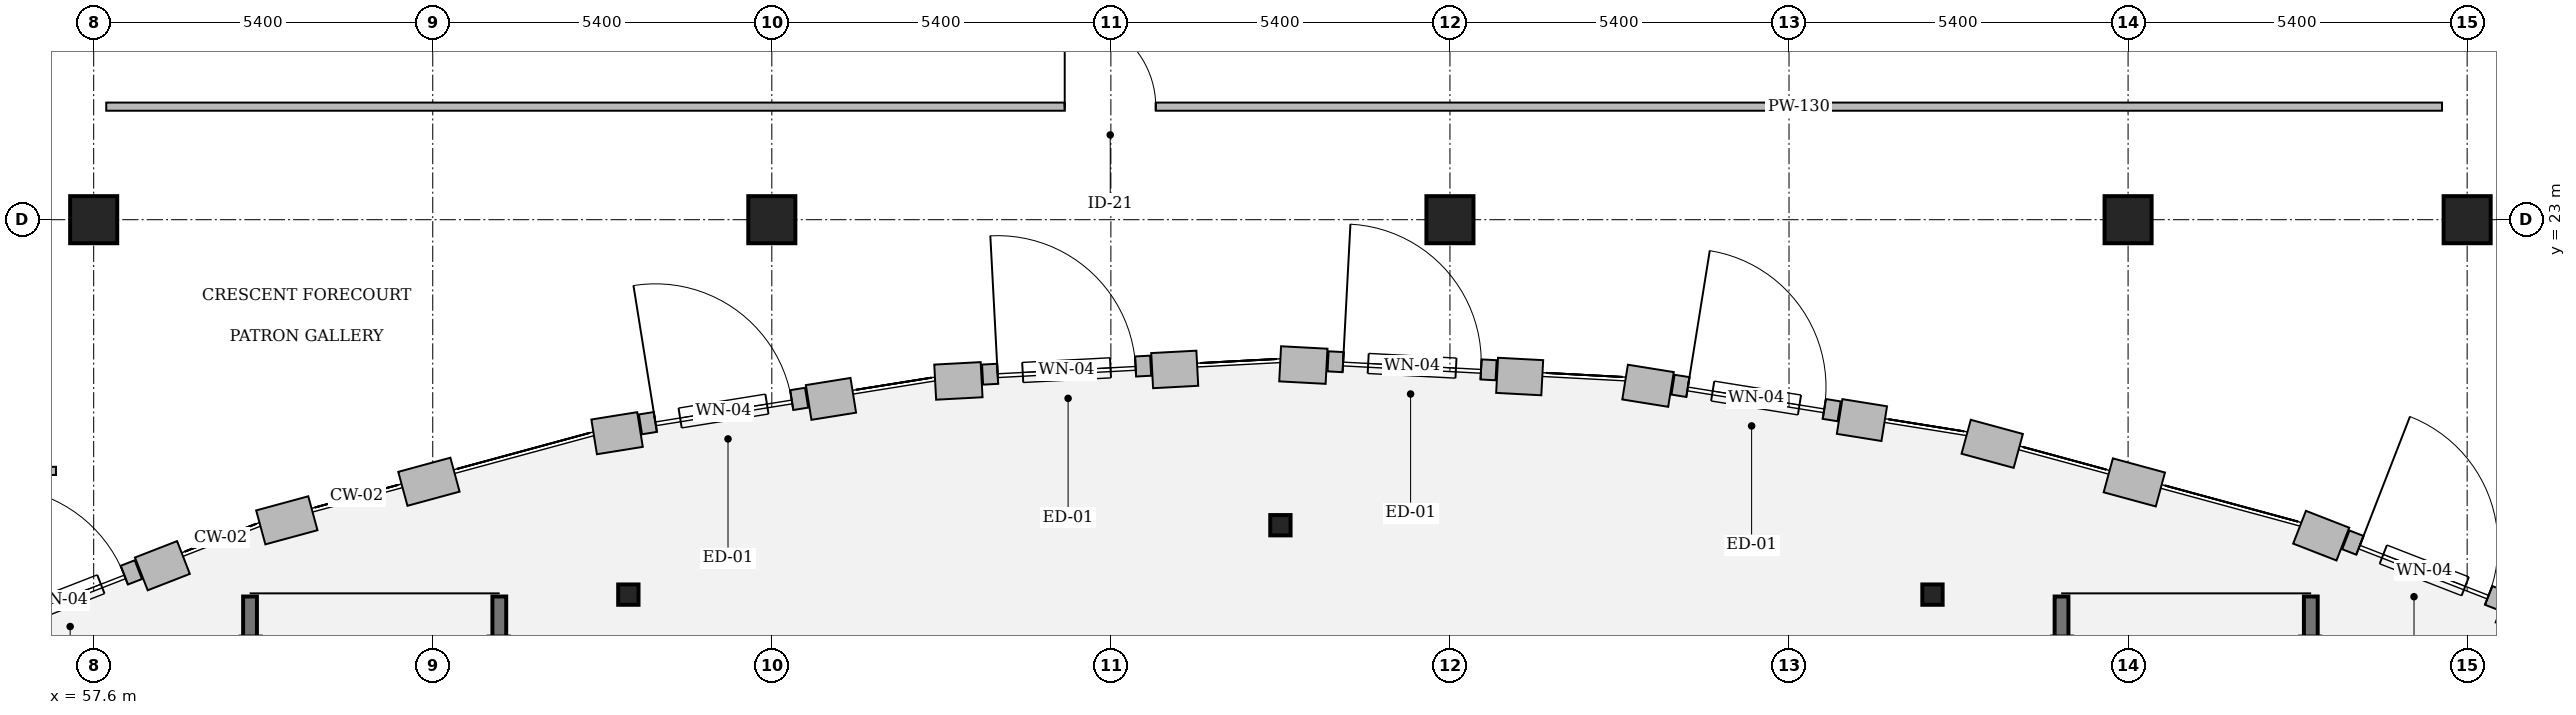
"""IFC4 building model, lengths in metres.
Left out: names, types, materials, properties, quantities, classifications, styles, units other than length and angle.
Written with IfcOpenShell. Run it as: python <this file> out.ifc"""

import sys

from ifc_helpers import new_model, si_unit, direction, frame, frame_2d, origin, origin_2d, place, context, subcontext, project, spatial, rectangle, circle, hollow_circle, extrude, element, fill, save


model = new_model("IFC4")
c1 = context("Model", 3, precision=1e-05, world=origin(), true_north=direction((0.0, 1.0)))
c2 = subcontext(c1, "Body", "Model", "MODEL_VIEW")
j1 = project(units=[si_unit("LENGTHUNIT", "METRE"), si_unit("PLANEANGLEUNIT", "RADIAN")], contexts=[c1])
p1 = place(None, origin())
s1 = spatial("IfcSite", under=j1, at=p1, CompositionType="ELEMENT")
p2 = place(p1, origin())
s2 = spatial("IfcBuilding", under=s1, at=p2, CompositionType="ELEMENT")
p3 = place(p2, origin())
s3 = spatial("IfcBuildingStorey", under=s2, at=p3, CompositionType="ELEMENT", Elevation=0.0)
for number, where, z_axis, x_axis in (
    (1, (68.4, 23.0, 0.0), (0.0, 0.0, 1.0), (1.0, 0.0, 0.0)),
    (2, (79.2, 23.0, 0.0), (0.0, 0.0, 1.0), (1.0, 0.0, 0.0)),
    (3, (90.0, 23.0, 0.0), (0.0, 0.0, 1.0), (1.0, 0.0, 0.0)),
    (4, (95.4, 23.0, 0.0), (0.0, 0.0, 1.0), (1.0, 0.0, 0.0)),
    (5, (57.6, 23.0, 0.0), (0.0, 0.0, 1.0), (1.0, 0.0, 0.0)),
):
    element("IfcColumn", number, at=place(p3, frame(where, z_axis=z_axis, x_axis=x_axis)), inside=s3, PredefinedType="COLUMN", context=c2, shape_type="SweptSolid", body=[
        extrude(circle(Radius=0.375, at=origin_2d()), origin(), (0.0, 0.0, 1.0), 4.8),
    ])
for number, where, z_axis, x_axis in (
    (6, (60.09, 9.015, 0.0), (0.0, 0.0, 1.0), (0.0, 1.0, 0.0)),
    (7, (64.06, 9.015, 0.0), (0.0, 0.0, 1.0), (0.0, 1.0, 0.0)),
    (8, (88.94, 9.015, 0.0), (0.0, 0.0, 1.0), (0.0, 1.0, 0.0)),
    (9, (92.91, 9.015, 0.0), (0.0, 0.0, 1.0), (0.0, 1.0, 0.0)),
):
    element("IfcWall", number, at=place(p3, frame(where, z_axis=z_axis, x_axis=x_axis)), inside=s3, PredefinedType="SOLIDWALL", context=c2, shape_type="SweptSolid", body=[
        extrude(rectangle(XDim=7.985, YDim=0.22, at=frame_2d((3.993, 0.0))), origin(), (0.0, 0.0, 1.0), 3.02),
    ])
p4 = place(p3, frame((58.359, 17.36, 0.0), z_axis=(0.0, 0.0, 1.0), x_axis=(0.931851856596, 0.362838968908, 0.0)))
e10 = element("IfcWall", 10, at=p4, inside=s3, PredefinedType="SOLIDWALL", context=c2, shape_type="SweptSolid", body=[
    extrude(rectangle(XDim=0.72, YDim=0.56, at=frame_2d((0.36, 0.0))), origin(), (0.0, 0.0, 1.0), 4.54),
])
p5 = place(p3, frame((55.813, 16.455, 0.0), z_axis=(0.0, 0.0, 1.0), x_axis=(0.931953372645, 0.362578144978, 0.0)))
e11 = element("IfcWall", 11, at=p5, inside=s3, PredefinedType="SOLIDWALL", context=c2, shape_type="SweptSolid", body=[
    extrude(rectangle(XDim=2.68, YDim=0.32, at=frame_2d((1.34, 0.0))), origin(), (0.0, 0.0, 1.0), 4.54),
])
p6 = place(p5, frame((0.64, 0.0, 2.58)))
e12 = element("IfcOpeningElement", 12, at=p6, cuts=e11, PredefinedType="OPENING", context=c2, shape_type="SweptSolid", body=[
    extrude(rectangle(XDim=1.4, YDim=1.8, at=frame_2d((0.7, 0.9))), frame((0.0, 0.18, 0.0), z_axis=(0.0, -1.0, 0.0), x_axis=(1.0, 0.0, 0.0)), (0.0, 0.0, 1.0), 0.36),
])
p7 = place(p5, frame((0.24, 0.0, 0.0)))
e13 = element("IfcOpeningElement", 13, at=p7, cuts=e11, PredefinedType="OPENING", context=c2, shape_type="SweptSolid", body=[
    extrude(rectangle(XDim=2.2, YDim=2.5, at=frame_2d((1.1, 1.25))), frame((0.0, 0.18, 0.0), z_axis=(0.0, -1.0, 0.0), x_axis=(1.0, 0.0, 0.0)), (0.0, 0.0, 1.0), 0.36),
])
p8 = place(p3, frame((60.261, 18.1, 0.0), z_axis=(0.0, 0.0, 1.0), x_axis=(0.965071022865, 0.261988398266, 0.0)))
e14 = element("IfcWall", 14, at=p8, inside=s3, PredefinedType="SOLIDWALL", context=c2, shape_type="SweptSolid", body=[
    extrude(rectangle(XDim=0.86, YDim=0.56, at=frame_2d((0.43, 0.0))), origin(), (0.0, 0.0, 1.0), 4.54),
])
p9 = place(p3, frame((62.524, 18.715, 0.0), z_axis=(0.0, 0.0, 1.0), x_axis=(0.965123305847, 0.261795730506, 0.0)))
e15 = element("IfcWall", 15, at=p9, inside=s3, PredefinedType="SOLIDWALL", context=c2, shape_type="SweptSolid", body=[
    extrude(rectangle(XDim=0.86, YDim=0.56, at=frame_2d((0.43, 0.0))), origin(), (0.0, 0.0, 1.0), 4.54),
])
p10 = place(p3, frame((65.57, 19.542, 0.0), z_axis=(0.0, 0.0, 1.0), x_axis=(0.987374648009, 0.158402349948, 0.0)))
e16 = element("IfcWall", 16, at=p10, inside=s3, PredefinedType="SOLIDWALL", context=c2, shape_type="SweptSolid", body=[
    extrude(rectangle(XDim=0.74, YDim=0.56, at=frame_2d((0.37, 0.0))), origin(), (0.0, 0.0, 1.0), 4.54),
])
p11 = place(p3, frame((68.987, 20.09, 0.0), z_axis=(0.0, 0.0, 1.0), x_axis=(0.98738343789, 0.158347549964, 0.0)))
e17 = element("IfcWall", 17, at=p11, inside=s3, PredefinedType="SOLIDWALL", context=c2, shape_type="SweptSolid", body=[
    extrude(rectangle(XDim=0.72, YDim=0.56, at=frame_2d((0.36, 0.0))), origin(), (0.0, 0.0, 1.0), 4.54),
])
p12 = place(p3, frame((66.308, 19.741, 0.0), z_axis=(0.0, 0.0, 1.0), x_axis=(0.987384856389, 0.158338704595, 0.0)))
e18 = element("IfcWall", 18, at=p12, inside=s3, PredefinedType="SOLIDWALL", context=c2, shape_type="SweptSolid", body=[
    extrude(rectangle(XDim=2.68, YDim=0.32, at=frame_2d((1.34, 0.0))), origin(), (0.0, 0.0, 1.0), 4.54),
])
p13 = place(p12, frame((0.64, 0.0, 2.58)))
e19 = element("IfcOpeningElement", 19, at=p13, cuts=e18, PredefinedType="OPENING", context=c2, shape_type="SweptSolid", body=[
    extrude(rectangle(XDim=1.4, YDim=1.8, at=frame_2d((0.7, 0.9))), frame((0.0, 0.18, 0.0), z_axis=(0.0, -1.0, 0.0), x_axis=(1.0, 0.0, 0.0)), (0.0, 0.0, 1.0), 0.36),
])
p14 = place(p12, frame((0.24, 0.0, 0.0)))
e20 = element("IfcOpeningElement", 20, at=p14, cuts=e18, PredefinedType="OPENING", context=c2, shape_type="SweptSolid", body=[
    extrude(rectangle(XDim=2.2, YDim=2.5, at=frame_2d((1.1, 1.25))), frame((0.0, 0.18, 0.0), z_axis=(0.0, -1.0, 0.0), x_axis=(1.0, 0.0, 0.0)), (0.0, 0.0, 1.0), 0.36),
])
p15 = place(p3, frame((71.002, 20.413, 0.0), z_axis=(0.0, 0.0, 1.0), x_axis=(0.998588513738, 0.053112900797, 0.0)))
e21 = element("IfcWall", 21, at=p15, inside=s3, PredefinedType="SOLIDWALL", context=c2, shape_type="SweptSolid", body=[
    extrude(rectangle(XDim=0.74, YDim=0.56, at=frame_2d((0.37, 0.0))), origin(), (0.0, 0.0, 1.0), 4.54),
])
p16 = place(p3, frame((74.457, 20.596, 0.0), z_axis=(0.0, 0.0, 1.0), x_axis=(0.998582006611, 0.05323510188, 0.0)))
e22 = element("IfcWall", 22, at=p16, inside=s3, PredefinedType="SOLIDWALL", context=c2, shape_type="SweptSolid", body=[
    extrude(rectangle(XDim=0.72, YDim=0.56, at=frame_2d((0.36, 0.0))), origin(), (0.0, 0.0, 1.0), 4.54),
])
p17 = place(p3, frame((71.757, 20.533, 0.0), z_axis=(0.0, 0.0, 1.0), x_axis=(0.998598384616, 0.052926989734, 0.0)))
e23 = element("IfcWall", 23, at=p17, inside=s3, PredefinedType="SOLIDWALL", context=c2, shape_type="SweptSolid", body=[
    extrude(rectangle(XDim=2.68, YDim=0.32, at=frame_2d((1.34, 0.0))), origin(), (0.0, 0.0, 1.0), 4.54),
])
p18 = place(p17, frame((0.64, 0.0, 2.58)))
e24 = element("IfcOpeningElement", 24, at=p18, cuts=e23, PredefinedType="OPENING", context=c2, shape_type="SweptSolid", body=[
    extrude(rectangle(XDim=1.4, YDim=1.8, at=frame_2d((0.7, 0.9))), frame((0.0, 0.18, 0.0), z_axis=(0.0, -1.0, 0.0), x_axis=(1.0, 0.0, 0.0)), (0.0, 0.0, 1.0), 0.36),
])
p19 = place(p17, frame((0.24, 0.0, 0.0)))
e25 = element("IfcOpeningElement", 25, at=p19, cuts=e23, PredefinedType="OPENING", context=c2, shape_type="SweptSolid", body=[
    extrude(rectangle(XDim=2.2, YDim=2.5, at=frame_2d((1.1, 1.25))), frame((0.0, 0.18, 0.0), z_axis=(0.0, -1.0, 0.0), x_axis=(1.0, 0.0, 0.0)), (0.0, 0.0, 1.0), 0.36),
])
p20 = place(p3, frame((76.496, 20.705, 0.0), z_axis=(0.0, 0.0, 1.0), x_axis=(0.99860503714, -0.052801323841, 0.0)))
e26 = element("IfcWall", 26, at=p20, inside=s3, PredefinedType="SOLIDWALL", context=c2, shape_type="SweptSolid", body=[
    extrude(rectangle(XDim=0.74, YDim=0.56, at=frame_2d((0.37, 0.0))), origin(), (0.0, 0.0, 1.0), 4.54),
])
p21 = place(p3, frame((79.951, 20.522, 0.0), z_axis=(0.0, 0.0, 1.0), x_axis=(0.998599974898, -0.052896976599, 0.0)))
e27 = element("IfcWall", 27, at=p21, inside=s3, PredefinedType="SOLIDWALL", context=c2, shape_type="SweptSolid", body=[
    extrude(rectangle(XDim=0.72, YDim=0.56, at=frame_2d((0.36, 0.0))), origin(), (0.0, 0.0, 1.0), 4.54),
])
p22 = place(p3, frame((77.259, 20.745, 0.0), z_axis=(0.0, 0.0, 1.0), x_axis=(0.998598639766, -0.052922175472, 0.0)))
e28 = element("IfcWall", 28, at=p22, inside=s3, PredefinedType="SOLIDWALL", context=c2, shape_type="SweptSolid", body=[
    extrude(rectangle(XDim=2.68, YDim=0.32, at=frame_2d((1.34, 0.0))), origin(), (0.0, 0.0, 1.0), 4.54),
])
p23 = place(p22, frame((0.64, 0.0, 2.58)))
e29 = element("IfcOpeningElement", 29, at=p23, cuts=e28, PredefinedType="OPENING", context=c2, shape_type="SweptSolid", body=[
    extrude(rectangle(XDim=1.4, YDim=1.8, at=frame_2d((0.7, 0.9))), frame((0.0, 0.18, 0.0), z_axis=(0.0, -1.0, 0.0), x_axis=(1.0, 0.0, 0.0)), (0.0, 0.0, 1.0), 0.36),
])
p24 = place(p22, frame((0.24, 0.0, 0.0)))
e30 = element("IfcOpeningElement", 30, at=p24, cuts=e28, PredefinedType="OPENING", context=c2, shape_type="SweptSolid", body=[
    extrude(rectangle(XDim=2.2, YDim=2.5, at=frame_2d((1.1, 1.25))), frame((0.0, 0.18, 0.0), z_axis=(0.0, -1.0, 0.0), x_axis=(1.0, 0.0, 0.0)), (0.0, 0.0, 1.0), 0.36),
])
p25 = place(p3, frame((81.99, 20.414, 0.0), z_axis=(0.0, 0.0, 1.0), x_axis=(0.987382924217, -0.158350752965, 0.0)))
e31 = element("IfcWall", 31, at=p25, inside=s3, PredefinedType="SOLIDWALL", context=c2, shape_type="SweptSolid", body=[
    extrude(rectangle(XDim=0.74, YDim=0.56, at=frame_2d((0.37, 0.0))), origin(), (0.0, 0.0, 1.0), 4.54),
])
p26 = place(p3, frame((85.406, 19.866, 0.0), z_axis=(0.0, 0.0, 1.0), x_axis=(0.98738343789, -0.158347549964, 0.0)))
e32 = element("IfcWall", 32, at=p26, inside=s3, PredefinedType="SOLIDWALL", context=c2, shape_type="SweptSolid", body=[
    extrude(rectangle(XDim=0.72, YDim=0.56, at=frame_2d((0.36, 0.0))), origin(), (0.0, 0.0, 1.0), 4.54),
])
p27 = place(p3, frame((82.752, 20.373, 0.0), z_axis=(0.0, 0.0, 1.0), x_axis=(0.987387140162, -0.158324462552, 0.0)))
e33 = element("IfcWall", 33, at=p27, inside=s3, PredefinedType="SOLIDWALL", context=c2, shape_type="SweptSolid", body=[
    extrude(rectangle(XDim=2.68, YDim=0.32, at=frame_2d((1.34, 0.0))), origin(), (0.0, 0.0, 1.0), 4.54),
])
p28 = place(p27, frame((0.64, 0.0, 2.58)))
e34 = element("IfcOpeningElement", 34, at=p28, cuts=e33, PredefinedType="OPENING", context=c2, shape_type="SweptSolid", body=[
    extrude(rectangle(XDim=1.4, YDim=1.8, at=frame_2d((0.7, 0.9))), frame((0.0, 0.18, 0.0), z_axis=(0.0, -1.0, 0.0), x_axis=(1.0, 0.0, 0.0)), (0.0, 0.0, 1.0), 0.36),
])
p29 = place(p27, frame((0.24, 0.0, 0.0)))
e35 = element("IfcOpeningElement", 35, at=p29, cuts=e33, PredefinedType="OPENING", context=c2, shape_type="SweptSolid", body=[
    extrude(rectangle(XDim=2.2, YDim=2.5, at=frame_2d((1.1, 1.25))), frame((0.0, 0.18, 0.0), z_axis=(0.0, -1.0, 0.0), x_axis=(1.0, 0.0, 0.0)), (0.0, 0.0, 1.0), 0.36),
])
p30 = place(p3, frame((87.421, 19.543, 0.0), z_axis=(0.0, 0.0, 1.0), x_axis=(0.965071022865, -0.261988398266, 0.0)))
e36 = element("IfcWall", 36, at=p30, inside=s3, PredefinedType="SOLIDWALL", context=c2, shape_type="SweptSolid", body=[
    extrude(rectangle(XDim=0.86, YDim=0.56, at=frame_2d((0.43, 0.0))), origin(), (0.0, 0.0, 1.0), 4.54),
])
p31 = place(p3, frame((89.685, 18.929, 0.0), z_axis=(0.0, 0.0, 1.0), x_axis=(0.965123305847, -0.261795730506, 0.0)))
e37 = element("IfcWall", 37, at=p31, inside=s3, PredefinedType="SOLIDWALL", context=c2, shape_type="SweptSolid", body=[
    extrude(rectangle(XDim=0.86, YDim=0.56, at=frame_2d((0.43, 0.0))), origin(), (0.0, 0.0, 1.0), 4.54),
])
p32 = place(p3, frame((92.731, 18.103, 0.0), z_axis=(0.0, 0.0, 1.0), x_axis=(0.932029444391, -0.362382553095, 0.0)))
e38 = element("IfcWall", 38, at=p32, inside=s3, PredefinedType="SOLIDWALL", context=c2, shape_type="SweptSolid", body=[
    extrude(rectangle(XDim=0.74, YDim=0.56, at=frame_2d((0.37, 0.0))), origin(), (0.0, 0.0, 1.0), 4.54),
])
p33 = place(p3, frame((95.956, 16.848, 0.0), z_axis=(0.0, 0.0, 1.0), x_axis=(0.931966478623, -0.362544456204, 0.0)))
e39 = element("IfcWall", 39, at=p33, inside=s3, PredefinedType="SOLIDWALL", context=c2, shape_type="SweptSolid", body=[
    extrude(rectangle(XDim=0.72, YDim=0.56, at=frame_2d((0.36, 0.0))), origin(), (0.0, 0.0, 1.0), 4.54),
])
p34 = place(p3, frame((93.468, 17.902, 0.0), z_axis=(0.0, 0.0, 1.0), x_axis=(0.931984153545, -0.362499017298, 0.0)))
e40 = element("IfcWall", 40, at=p34, inside=s3, PredefinedType="SOLIDWALL", context=c2, shape_type="SweptSolid", body=[
    extrude(rectangle(XDim=2.68, YDim=0.32, at=frame_2d((1.34, 0.0))), origin(), (0.0, 0.0, 1.0), 4.54),
])
p35 = place(p34, frame((0.64, 0.0, 2.58)))
e41 = element("IfcOpeningElement", 41, at=p35, cuts=e40, PredefinedType="OPENING", context=c2, shape_type="SweptSolid", body=[
    extrude(rectangle(XDim=1.4, YDim=1.8, at=frame_2d((0.7, 0.9))), frame((0.0, 0.18, 0.0), z_axis=(0.0, -1.0, 0.0), x_axis=(1.0, 0.0, 0.0)), (0.0, 0.0, 1.0), 0.36),
])
p36 = place(p34, frame((0.24, 0.0, 0.0)))
e42 = element("IfcOpeningElement", 42, at=p36, cuts=e40, PredefinedType="OPENING", context=c2, shape_type="SweptSolid", body=[
    extrude(rectangle(XDim=2.2, YDim=2.5, at=frame_2d((1.1, 1.25))), frame((0.0, 0.18, 0.0), z_axis=(0.0, -1.0, 0.0), x_axis=(1.0, 0.0, 0.0)), (0.0, 0.0, 1.0), 0.36),
])
for number, where, z_axis, x_axis in (
    (43, (66.115, 17.03, 0.0), (0.0, 0.0, 1.0), (1.0, 0.0, 0.0)),
    (44, (76.5, 18.135, 0.0), (0.0, 0.0, 1.0), (1.0, 0.0, 0.0)),
    (45, (86.885, 17.03, 0.0), (0.0, 0.0, 1.0), (1.0, 0.0, 0.0)),
):
    element("IfcColumn", number, at=place(p3, frame(where, z_axis=z_axis, x_axis=x_axis)), inside=s3, PredefinedType="COLUMN", context=c2, shape_type="SweptSolid", body=[
        extrude(hollow_circle(Radius=0.162, WallThickness=0.012, at=origin_2d()), origin(), (0.0, 0.0, 1.0), 4.44),
    ])
p37 = place(p3, frame((43.6, 19.0, 0.0), z_axis=(0.0, 0.0, 1.0), x_axis=(1.0, 0.0, 0.0)))
e46 = element("IfcWall", 46, at=p37, inside=s3, PredefinedType="PARTITIONING", context=c2, shape_type="SweptSolid", body=[
    extrude(rectangle(XDim=13.4, YDim=0.13, at=frame_2d((6.7, 0.0))), origin(), (0.0, 0.0, 1.0), 4.54),
])
p38 = place(p37, frame((10.429, 0.0, 0.0)))
e47 = element("IfcOpeningElement", 47, at=p38, cuts=e46, PredefinedType="OPENING", context=c2, shape_type="SweptSolid", body=[
    extrude(rectangle(XDim=0.9, YDim=2.15, at=frame_2d((0.45, 1.075))), frame((0.0, 0.085, 0.0), z_axis=(0.0, -1.0, 0.0), x_axis=(1.0, 0.0, 0.0)), (0.0, 0.0, 1.0), 0.17),
])
p39 = place(p3, frame((57.8, 24.8, 0.0), z_axis=(0.0, 0.0, 1.0), x_axis=(1.0, 0.0, 0.0)))
e48 = element("IfcWall", 48, at=p39, inside=s3, PredefinedType="PARTITIONING", context=c2, shape_type="SweptSolid", body=[
    extrude(rectangle(XDim=37.2, YDim=0.13, at=frame_2d((18.6, 0.0))), origin(), (0.0, 0.0, 1.0), 4.54),
])
p40 = place(p39, frame((15.265, 0.0, 0.0)))
e49 = element("IfcOpeningElement", 49, at=p40, cuts=e48, PredefinedType="OPENING", context=c2, shape_type="SweptSolid", body=[
    extrude(rectangle(XDim=1.45, YDim=2.2, at=frame_2d((0.725, 1.1))), frame((0.0, 0.085, 0.0), z_axis=(0.0, -1.0, 0.0), x_axis=(1.0, 0.0, 0.0)), (0.0, 0.0, 1.0), 0.17),
])
p41 = place(p6, origin())
e50 = element("IfcWindow", 50, at=p41, inside=s3, PartitioningType="SINGLE_PANEL", PredefinedType="WINDOW", context=c2, shape_type="SweptSolid", body=[
    extrude(rectangle(XDim=1.4, YDim=1.8, at=frame_2d((0.7, 0.9))), frame((0.0, 0.03, 0.0), z_axis=(0.0, -1.0, 0.0), x_axis=(1.0, 0.0, 0.0)), (0.0, 0.0, 1.0), 0.06),
])
fill(e12, e50)
p42 = place(p7, origin())
e51 = element("IfcDoor", 51, at=p42, inside=s3, OperationType="SINGLE_SWING_LEFT", PredefinedType="DOOR", context=c2, shape_type="SweptSolid", body=[
    extrude(rectangle(XDim=2.2, YDim=2.5, at=frame_2d((1.1, 1.25))), frame((0.0, 0.025, 0.0), z_axis=(0.0, -1.0, 0.0), x_axis=(1.0, 0.0, 0.0)), (0.0, 0.0, 1.0), 0.05),
])
fill(e13, e51)
p43 = place(p13, origin())
e52 = element("IfcWindow", 52, at=p43, inside=s3, PartitioningType="SINGLE_PANEL", PredefinedType="WINDOW", context=c2, shape_type="SweptSolid", body=[
    extrude(rectangle(XDim=1.4, YDim=1.8, at=frame_2d((0.7, 0.9))), frame((0.0, 0.03, 0.0), z_axis=(0.0, -1.0, 0.0), x_axis=(1.0, 0.0, 0.0)), (0.0, 0.0, 1.0), 0.06),
])
fill(e19, e52)
p44 = place(p14, origin())
e53 = element("IfcDoor", 53, at=p44, inside=s3, OperationType="SINGLE_SWING_LEFT", PredefinedType="DOOR", context=c2, shape_type="SweptSolid", body=[
    extrude(rectangle(XDim=2.2, YDim=2.5, at=frame_2d((1.1, 1.25))), frame((0.0, 0.025, 0.0), z_axis=(0.0, -1.0, 0.0), x_axis=(1.0, 0.0, 0.0)), (0.0, 0.0, 1.0), 0.05),
])
fill(e20, e53)
p45 = place(p18, origin())
e54 = element("IfcWindow", 54, at=p45, inside=s3, PartitioningType="SINGLE_PANEL", PredefinedType="WINDOW", context=c2, shape_type="SweptSolid", body=[
    extrude(rectangle(XDim=1.4, YDim=1.8, at=frame_2d((0.7, 0.9))), frame((0.0, 0.03, 0.0), z_axis=(0.0, -1.0, 0.0), x_axis=(1.0, 0.0, 0.0)), (0.0, 0.0, 1.0), 0.06),
])
fill(e24, e54)
p46 = place(p19, origin())
e55 = element("IfcDoor", 55, at=p46, inside=s3, OperationType="SINGLE_SWING_LEFT", PredefinedType="DOOR", context=c2, shape_type="SweptSolid", body=[
    extrude(rectangle(XDim=2.2, YDim=2.5, at=frame_2d((1.1, 1.25))), frame((0.0, 0.025, 0.0), z_axis=(0.0, -1.0, 0.0), x_axis=(1.0, 0.0, 0.0)), (0.0, 0.0, 1.0), 0.05),
])
fill(e25, e55)
p47 = place(p23, origin())
e56 = element("IfcWindow", 56, at=p47, inside=s3, PartitioningType="SINGLE_PANEL", PredefinedType="WINDOW", context=c2, shape_type="SweptSolid", body=[
    extrude(rectangle(XDim=1.4, YDim=1.8, at=frame_2d((0.7, 0.9))), frame((0.0, 0.03, 0.0), z_axis=(0.0, -1.0, 0.0), x_axis=(1.0, 0.0, 0.0)), (0.0, 0.0, 1.0), 0.06),
])
fill(e29, e56)
p48 = place(p24, origin())
e57 = element("IfcDoor", 57, at=p48, inside=s3, OperationType="SINGLE_SWING_LEFT", PredefinedType="DOOR", context=c2, shape_type="SweptSolid", body=[
    extrude(rectangle(XDim=2.2, YDim=2.5, at=frame_2d((1.1, 1.25))), frame((0.0, 0.025, 0.0), z_axis=(0.0, -1.0, 0.0), x_axis=(1.0, 0.0, 0.0)), (0.0, 0.0, 1.0), 0.05),
])
fill(e30, e57)
p49 = place(p28, origin())
e58 = element("IfcWindow", 58, at=p49, inside=s3, PartitioningType="SINGLE_PANEL", PredefinedType="WINDOW", context=c2, shape_type="SweptSolid", body=[
    extrude(rectangle(XDim=1.4, YDim=1.8, at=frame_2d((0.7, 0.9))), frame((0.0, 0.03, 0.0), z_axis=(0.0, -1.0, 0.0), x_axis=(1.0, 0.0, 0.0)), (0.0, 0.0, 1.0), 0.06),
])
fill(e34, e58)
p50 = place(p29, origin())
e59 = element("IfcDoor", 59, at=p50, inside=s3, OperationType="SINGLE_SWING_LEFT", PredefinedType="DOOR", context=c2, shape_type="SweptSolid", body=[
    extrude(rectangle(XDim=2.2, YDim=2.5, at=frame_2d((1.1, 1.25))), frame((0.0, 0.025, 0.0), z_axis=(0.0, -1.0, 0.0), x_axis=(1.0, 0.0, 0.0)), (0.0, 0.0, 1.0), 0.05),
])
fill(e35, e59)
p51 = place(p35, origin())
e60 = element("IfcWindow", 60, at=p51, inside=s3, PartitioningType="SINGLE_PANEL", PredefinedType="WINDOW", context=c2, shape_type="SweptSolid", body=[
    extrude(rectangle(XDim=1.4, YDim=1.8, at=frame_2d((0.7, 0.9))), frame((0.0, 0.03, 0.0), z_axis=(0.0, -1.0, 0.0), x_axis=(1.0, 0.0, 0.0)), (0.0, 0.0, 1.0), 0.06),
])
fill(e41, e60)
p52 = place(p36, origin())
e61 = element("IfcDoor", 61, at=p52, inside=s3, OperationType="SINGLE_SWING_LEFT", PredefinedType="DOOR", context=c2, shape_type="SweptSolid", body=[
    extrude(rectangle(XDim=2.2, YDim=2.5, at=frame_2d((1.1, 1.25))), frame((0.0, 0.025, 0.0), z_axis=(0.0, -1.0, 0.0), x_axis=(1.0, 0.0, 0.0)), (0.0, 0.0, 1.0), 0.05),
])
fill(e42, e61)
p53 = place(p40, origin())
e62 = element("IfcDoor", 62, at=p53, inside=s3, OperationType="DOUBLE_DOOR_SINGLE_SWING", PredefinedType="DOOR", context=c2, shape_type="SweptSolid", body=[
    extrude(rectangle(XDim=1.45, YDim=2.2, at=frame_2d((0.725, 1.1))), frame((0.0, 0.025, 0.0), z_axis=(0.0, -1.0, 0.0), x_axis=(1.0, 0.0, 0.0)), (0.0, 0.0, 1.0), 0.05),
])
fill(e49, e62)
save(model, sys.argv[1])
